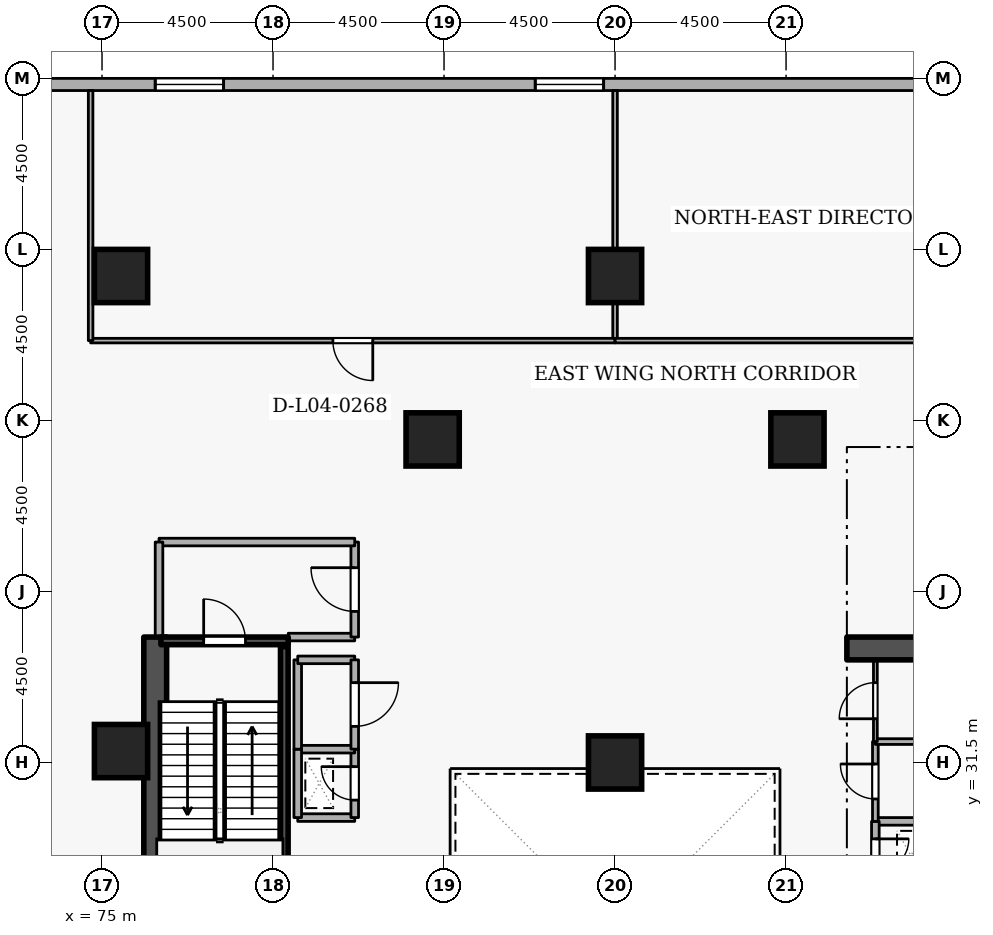
"""IFC4 building model, lengths in metres.
Left out: names, types, materials, properties, quantities, classifications, styles, units other than length and angle.
Written with IfcOpenShell. Run it as: python <this file> out.ifc"""

import sys

from ifc_helpers import new_model, si_unit, direction, frame, frame_2d, origin, origin_2d, place, context, subcontext, project, spatial, rectangle, extrude, element, fill, save


model = new_model("IFC4")
c1 = context("Model", 3, precision=1e-05, world=origin(), true_north=direction((0.0, 1.0)))
c2 = subcontext(c1, "Body", "Model", "MODEL_VIEW")
j1 = project(units=[si_unit("LENGTHUNIT", "METRE"), si_unit("PLANEANGLEUNIT", "RADIAN")], contexts=[c1])
p1 = place(None, origin())
s1 = spatial("IfcSite", under=j1, at=p1, CompositionType="ELEMENT")
p2 = place(p1, origin())
s2 = spatial("IfcBuilding", under=s1, at=p2, CompositionType="ELEMENT")
p3 = place(p2, frame((0.0, 0.0, 18.6)))
s3 = spatial("IfcBuildingStorey", under=s2, at=p3, CompositionType="ELEMENT", Elevation=18.6)
p4 = place(p3, frame((94.6, 34.5, 0.0), z_axis=(0.0, 0.0, 1.0), x_axis=(1.0, 0.0, 0.0)))
e1 = element("IfcWall", 1, at=p4, inside=s3, PredefinedType="SHEAR", context=c2, shape_type="SweptSolid", body=[
    extrude(rectangle(XDim=5.7, YDim=0.6, at=frame_2d((2.85, 0.0))), origin(), (0.0, 0.0, 1.0), 4.5),
])
p5 = place(p3, frame((76.4, 19.2, 0.0), z_axis=(0.0, 0.0, 1.0), x_axis=(0.0, 1.0, 0.0)))
e2 = element("IfcWall", 2, at=p5, inside=s3, PredefinedType="SHEAR", context=c2, shape_type="SweptSolid", body=[
    extrude(rectangle(XDim=15.6, YDim=0.6, at=frame_2d((7.8, 0.0))), origin(), (0.0, 0.0, 1.0), 4.5),
])
for number, where, z_axis, x_axis in (
    (3, (88.5, 44.3, 0.0), (0.0, 0.0, 1.0), (1.0, 0.0, 0.0)),
    (4, (75.5, 44.3, 0.0), (0.0, 0.0, 1.0), (1.0, 0.0, 0.0)),
    (5, (93.3, 40.0, 0.0), (0.0, 0.0, 1.0), (1.0, 0.0, 0.0)),
    (6, (83.7, 40.0, 0.0), (0.0, 0.0, 1.0), (1.0, 0.0, 0.0)),
    (7, (75.5, 31.8, 0.0), (0.0, 0.0, 1.0), (1.0, 0.0, 0.0)),
    (8, (88.5, 31.5, 0.0), (0.0, 0.0, 1.0), (1.0, 0.0, 0.0)),
):
    element("IfcColumn", number, at=place(p3, frame(where, z_axis=z_axis, x_axis=x_axis)), inside=s3, PredefinedType="COLUMN", context=c2, shape_type="SweptSolid", body=[
        extrude(rectangle(XDim=1.4, YDim=1.4, at=origin_2d()), origin(), (0.0, 0.0, 1.0), 4.5),
    ])
p6 = place(p3, frame((111.0, 49.34, 0.0), z_axis=(0.0, 0.0, 1.0), x_axis=(-1.0, 0.0, 0.0)))
e9 = element("IfcWall", 9, at=p6, inside=s3, PredefinedType="STANDARD", context=c2, shape_type="SweptSolid", body=[
    extrude(rectangle(XDim=39.4, YDim=0.32, at=frame_2d((19.7, 0.0))), origin(), (0.0, 0.0, 1.0), 3.56),
])
p7 = place(p6, frame((3.0, 0.0, 0.78)))
e10 = element("IfcOpeningElement", 10, at=p7, cuts=e9, PredefinedType="OPENING", context=c2, shape_type="SweptSolid", body=[
    extrude(rectangle(XDim=1.8, YDim=2.15, at=frame_2d((0.9, 1.075))), frame((0.0, 0.17, 0.0), z_axis=(0.0, -1.0, 0.0), x_axis=(1.0, 0.0, 0.0)), (0.0, 0.0, 1.0), 0.34),
])
p8 = place(p6, frame((12.8, 0.0, 0.78)))
e11 = element("IfcOpeningElement", 11, at=p8, cuts=e9, PredefinedType="OPENING", context=c2, shape_type="SweptSolid", body=[
    extrude(rectangle(XDim=1.8, YDim=2.15, at=frame_2d((0.9, 1.075))), frame((0.0, 0.17, 0.0), z_axis=(0.0, -1.0, 0.0), x_axis=(1.0, 0.0, 0.0)), (0.0, 0.0, 1.0), 0.34),
])
p9 = place(p6, frame((22.8, 0.0, 0.78)))
e12 = element("IfcOpeningElement", 12, at=p9, cuts=e9, PredefinedType="OPENING", context=c2, shape_type="SweptSolid", body=[
    extrude(rectangle(XDim=1.8, YDim=2.15, at=frame_2d((0.9, 1.075))), frame((0.0, 0.17, 0.0), z_axis=(0.0, -1.0, 0.0), x_axis=(1.0, 0.0, 0.0)), (0.0, 0.0, 1.0), 0.34),
])
p10 = place(p6, frame((32.8, 0.0, 0.78)))
e13 = element("IfcOpeningElement", 13, at=p10, cuts=e9, PredefinedType="OPENING", context=c2, shape_type="SweptSolid", body=[
    extrude(rectangle(XDim=1.8, YDim=2.15, at=frame_2d((0.9, 1.075))), frame((0.0, 0.17, 0.0), z_axis=(0.0, -1.0, 0.0), x_axis=(1.0, 0.0, 0.0)), (0.0, 0.0, 1.0), 0.34),
])
p11 = place(p3, frame((76.55, 34.7, 0.0), z_axis=(0.0, 0.0, 1.0), x_axis=(1.0, 0.0, 0.0)))
e14 = element("IfcWall", 14, at=p11, inside=s3, PredefinedType="SHEAR", context=c2, shape_type="SweptSolid", body=[
    extrude(rectangle(XDim=3.35, YDim=0.2, at=frame_2d((1.675, 0.0))), origin(), (0.0, 0.0, 1.0), 4.5),
])
p12 = place(p11, frame((1.125, 0.0, 0.0)))
e15 = element("IfcOpeningElement", 15, at=p12, cuts=e14, PredefinedType="OPENING", context=c2, shape_type="SweptSolid", body=[
    extrude(rectangle(XDim=1.1, YDim=2.1, at=frame_2d((0.55, 1.05))), frame((0.0, 0.11, 0.0), z_axis=(0.0, -1.0, 0.0), x_axis=(1.0, 0.0, 0.0)), (0.0, 0.0, 1.0), 0.22),
])
p13 = place(p3, frame((79.797, 27.45, 0.0), z_axis=(0.0, 0.0, 1.0), x_axis=(0.0, 1.0, 0.0)))
e16 = element("IfcWall", 16, at=p13, inside=s3, PredefinedType="SHEAR", context=c2, shape_type="SweptSolid", body=[
    extrude(rectangle(XDim=7.1, YDim=0.2, at=frame_2d((3.55, 0.0))), origin(), (0.0, 0.0, 1.0), 4.5),
])
p14 = place(p3, frame((79.9, 34.8, 0.0), z_axis=(0.0, 0.0, 1.0), x_axis=(1.0, 0.0, 0.0)))
e17 = element("IfcWall", 17, at=p14, inside=s3, PredefinedType="STANDARD", context=c2, shape_type="SweptSolid", body=[
    extrude(rectangle(XDim=1.75, YDim=0.2, at=frame_2d((0.875, 0.0))), origin(), (0.0, 0.0, 1.0), 3.365),
])
p15 = place(p3, frame((81.65, 34.8, 0.0), z_axis=(0.0, 0.0, 1.0), x_axis=(0.0, 1.0, 0.0)))
e18 = element("IfcWall", 18, at=p15, inside=s3, PredefinedType="STANDARD", context=c2, shape_type="SweptSolid", body=[
    extrude(rectangle(XDim=2.5, YDim=0.2, at=frame_2d((1.25, 0.0))), origin(), (0.0, 0.0, 1.0), 4.16),
])
p16 = place(p15, frame((0.675, 0.0, 0.0)))
e19 = element("IfcOpeningElement", 19, at=p16, cuts=e18, PredefinedType="OPENING", context=c2, shape_type="SweptSolid", body=[
    extrude(rectangle(XDim=1.15, YDim=2.1, at=frame_2d((0.575, 1.05))), frame((0.0, 0.11, 0.0), z_axis=(0.0, -1.0, 0.0), x_axis=(1.0, 0.0, 0.0)), (0.0, 0.0, 1.0), 0.22),
])
p17 = place(p3, frame((81.65, 37.3, 0.0), z_axis=(0.0, 0.0, 1.0), x_axis=(-1.0, 0.0, 0.0)))
e20 = element("IfcWall", 20, at=p17, inside=s3, PredefinedType="STANDARD", context=c2, shape_type="SweptSolid", body=[
    extrude(rectangle(XDim=5.15, YDim=0.2, at=frame_2d((2.575, 0.0))), origin(), (0.0, 0.0, 1.0), 4.16),
])
p18 = place(p3, frame((76.5, 37.3, 0.0), z_axis=(0.0, 0.0, 1.0), x_axis=(0.0, -1.0, 0.0)))
e21 = element("IfcWall", 21, at=p18, inside=s3, PredefinedType="STANDARD", context=c2, shape_type="SweptSolid", body=[
    extrude(rectangle(XDim=2.5, YDim=0.2, at=frame_2d((1.25, 0.0))), origin(), (0.0, 0.0, 1.0), 4.16),
])
p19 = place(p3, frame((96.85, 29.95, 0.0), z_axis=(0.0, 0.0, 1.0), x_axis=(-1.0, 0.0, 0.0)))
e22 = element("IfcWall", 22, at=p19, inside=s3, PredefinedType="STANDARD", context=c2, shape_type="SweptSolid", body=[
    extrude(rectangle(XDim=1.5, YDim=0.2, at=frame_2d((0.75, 0.0))), origin(), (0.0, 0.0, 1.0), 4.16),
])
p20 = place(p3, frame((95.35, 29.95, 0.0), z_axis=(0.0, 0.0, 1.0), x_axis=(0.0, -1.0, 0.0)))
e23 = element("IfcWall", 23, at=p20, inside=s3, PredefinedType="STANDARD", context=c2, shape_type="SweptSolid", body=[
    extrude(rectangle(XDim=1.8, YDim=0.2, at=frame_2d((0.9, 0.0))), origin(), (0.0, 0.0, 1.0), 4.16),
])
p21 = place(p20, frame((0.46, 0.0, 0.0)))
e24 = element("IfcOpeningElement", 24, at=p21, cuts=e23, PredefinedType="OPENING", context=c2, shape_type="SweptSolid", body=[
    extrude(rectangle(XDim=0.88, YDim=2.04, at=frame_2d((0.44, 1.02))), frame((0.0, 0.11, 0.0), z_axis=(0.0, -1.0, 0.0), x_axis=(1.0, 0.0, 0.0)), (0.0, 0.0, 1.0), 0.22),
])
p22 = place(p3, frame((80.15, 30.05, 0.0), z_axis=(0.0, 0.0, 1.0), x_axis=(1.0, 0.0, 0.0)))
e25 = element("IfcWall", 25, at=p22, inside=s3, PredefinedType="STANDARD", context=c2, shape_type="SweptSolid", body=[
    extrude(rectangle(XDim=1.5, YDim=0.2, at=frame_2d((0.75, 0.0))), origin(), (0.0, 0.0, 1.0), 4.16),
])
p23 = place(p3, frame((81.65, 30.05, 0.0), z_axis=(0.0, 0.0, 1.0), x_axis=(0.0, 1.0, 0.0)))
e26 = element("IfcWall", 26, at=p23, inside=s3, PredefinedType="STANDARD", context=c2, shape_type="SweptSolid", body=[
    extrude(rectangle(XDim=1.8, YDim=0.2, at=frame_2d((0.9, 0.0))), origin(), (0.0, 0.0, 1.0), 4.16),
])
p24 = place(p23, frame((0.46, 0.0, 0.0)))
e27 = element("IfcOpeningElement", 27, at=p24, cuts=e26, PredefinedType="OPENING", context=c2, shape_type="SweptSolid", body=[
    extrude(rectangle(XDim=0.88, YDim=2.04, at=frame_2d((0.44, 1.02))), frame((0.0, 0.11, 0.0), z_axis=(0.0, -1.0, 0.0), x_axis=(1.0, 0.0, 0.0)), (0.0, 0.0, 1.0), 0.22),
])
p25 = place(p3, frame((81.65, 31.85, 0.0), z_axis=(0.0, 0.0, 1.0), x_axis=(-1.0, 0.0, 0.0)))
e28 = element("IfcWall", 28, at=p25, inside=s3, PredefinedType="STANDARD", context=c2, shape_type="SweptSolid", body=[
    extrude(rectangle(XDim=1.5, YDim=0.2, at=frame_2d((0.75, 0.0))), origin(), (0.0, 0.0, 1.0), 4.16),
])
p26 = place(p3, frame((80.15, 31.85, 0.0), z_axis=(0.0, 0.0, 1.0), x_axis=(0.0, -1.0, 0.0)))
e29 = element("IfcWall", 29, at=p26, inside=s3, PredefinedType="STANDARD", context=c2, shape_type="SweptSolid", body=[
    extrude(rectangle(XDim=1.8, YDim=0.2, at=frame_2d((0.9, 0.0))), origin(), (0.0, 0.0, 1.0), 4.16),
])
p27 = place(p3, frame((80.15, 31.85, 0.0), z_axis=(0.0, 0.0, 1.0), x_axis=(0.0, 1.0, 0.0)))
e30 = element("IfcWall", 30, at=p27, inside=s3, PredefinedType="STANDARD", context=c2, shape_type="SweptSolid", body=[
    extrude(rectangle(XDim=2.35, YDim=0.2, at=frame_2d((1.175, 0.0))), origin(), (0.0, 0.0, 1.0), 4.16),
])
p28 = place(p3, frame((80.15, 34.2, 0.0), z_axis=(0.0, 0.0, 1.0), x_axis=(1.0, 0.0, 0.0)))
e31 = element("IfcWall", 31, at=p28, inside=s3, PredefinedType="STANDARD", context=c2, shape_type="SweptSolid", body=[
    extrude(rectangle(XDim=1.5, YDim=0.2, at=frame_2d((0.75, 0.0))), origin(), (0.0, 0.0, 1.0), 3.365),
])
p29 = place(p3, frame((81.65, 34.2, 0.0), z_axis=(0.0, 0.0, 1.0), x_axis=(0.0, -1.0, 0.0)))
e32 = element("IfcWall", 32, at=p29, inside=s3, PredefinedType="STANDARD", context=c2, shape_type="SweptSolid", body=[
    extrude(rectangle(XDim=2.35, YDim=0.2, at=frame_2d((1.175, 0.0))), origin(), (0.0, 0.0, 1.0), 4.16),
])
p30 = place(p29, frame((0.6, 0.0, 0.0)))
e33 = element("IfcOpeningElement", 33, at=p30, cuts=e32, PredefinedType="OPENING", context=c2, shape_type="SweptSolid", body=[
    extrude(rectangle(XDim=1.15, YDim=2.1, at=frame_2d((0.575, 1.05))), frame((0.0, 0.11, 0.0), z_axis=(0.0, -1.0, 0.0), x_axis=(1.0, 0.0, 0.0)), (0.0, 0.0, 1.0), 0.22),
])
p31 = place(p3, frame((95.35, 29.95, 0.0), z_axis=(0.0, 0.0, 1.0), x_axis=(0.0, 1.0, 0.0)))
e34 = element("IfcWall", 34, at=p31, inside=s3, PredefinedType="PARTITIONING", context=c2, shape_type="SweptSolid", body=[
    extrude(rectangle(XDim=2.1, YDim=0.15, at=frame_2d((1.05, 0.0))), origin(), (0.0, 0.0, 1.0), 4.16),
])
p32 = place(p31, frame((0.59, 0.0, 0.0)))
e35 = element("IfcOpeningElement", 35, at=p32, cuts=e34, PredefinedType="OPENING", context=c2, shape_type="SweptSolid", body=[
    extrude(rectangle(XDim=0.92, YDim=2.08, at=frame_2d((0.46, 1.04))), frame((0.0, 0.085, 0.0), z_axis=(0.0, -1.0, 0.0), x_axis=(1.0, 0.0, 0.0)), (0.0, 0.0, 1.0), 0.17),
])
p33 = place(p3, frame((95.35, 32.05, 0.0), z_axis=(0.0, 0.0, 1.0), x_axis=(1.0, 0.0, 0.0)))
e36 = element("IfcWall", 36, at=p33, inside=s3, PredefinedType="PARTITIONING", context=c2, shape_type="SweptSolid", body=[
    extrude(rectangle(XDim=1.5, YDim=0.15, at=frame_2d((0.75, 0.0))), origin(), (0.0, 0.0, 1.0), 4.16),
])
p34 = place(p3, frame((95.35, 32.05, 0.0), z_axis=(0.0, 0.0, 1.0), x_axis=(0.0, 1.0, 0.0)))
e37 = element("IfcWall", 37, at=p34, inside=s3, PredefinedType="PARTITIONING", context=c2, shape_type="SweptSolid", body=[
    extrude(rectangle(XDim=2.15, YDim=0.1, at=frame_2d((1.075, 0.0))), origin(), (0.0, 0.0, 1.0), 4.16),
])
p35 = place(p34, frame((0.6, 0.0, 0.0)))
e38 = element("IfcOpeningElement", 38, at=p35, cuts=e37, PredefinedType="OPENING", context=c2, shape_type="SweptSolid", body=[
    extrude(rectangle(XDim=0.95, YDim=2.1, at=frame_2d((0.475, 1.05))), frame((0.0, 0.06, 0.0), z_axis=(0.0, -1.0, 0.0), x_axis=(1.0, 0.0, 0.0)), (0.0, 0.0, 1.0), 0.12),
])
p36 = place(p3, frame((88.5, 49.18, 0.0), z_axis=(0.0, 0.0, 1.0), x_axis=(0.0, -1.0, 0.0)))
e39 = element("IfcWall", 39, at=p36, inside=s3, PredefinedType="PARTITIONING", context=c2, shape_type="SweptSolid", body=[
    extrude(rectangle(XDim=6.58, YDim=0.12, at=frame_2d((3.29, 0.0))), origin(), (0.0, 0.0, 1.0), 4.16),
])
p37 = place(p3, frame((88.5, 42.6, 0.0), z_axis=(0.0, 0.0, 1.0), x_axis=(-1.0, 0.0, 0.0)))
e40 = element("IfcWall", 40, at=p37, inside=s3, PredefinedType="PARTITIONING", context=c2, shape_type="SweptSolid", body=[
    extrude(rectangle(XDim=13.8, YDim=0.12, at=frame_2d((6.9, 0.0))), origin(), (0.0, 0.0, 1.0), 4.16),
])
p38 = place(p37, frame((6.375, 0.0, 0.0)))
e41 = element("IfcOpeningElement", 41, at=p38, cuts=e40, PredefinedType="OPENING", context=c2, shape_type="SweptSolid", body=[
    extrude(rectangle(XDim=1.05, YDim=2.1, at=frame_2d((0.525, 1.05))), frame((0.0, 0.07, 0.0), z_axis=(0.0, -1.0, 0.0), x_axis=(1.0, 0.0, 0.0)), (0.0, 0.0, 1.0), 0.14),
])
p39 = place(p3, frame((74.7, 42.6, 0.0), z_axis=(0.0, 0.0, 1.0), x_axis=(0.0, 1.0, 0.0)))
e42 = element("IfcWall", 42, at=p39, inside=s3, PredefinedType="PARTITIONING", context=c2, shape_type="SweptSolid", body=[
    extrude(rectangle(XDim=6.58, YDim=0.12, at=frame_2d((3.29, 0.0))), origin(), (0.0, 0.0, 1.0), 4.16),
])
p40 = place(p3, frame((110.7, 42.6, 0.0), z_axis=(0.0, 0.0, 1.0), x_axis=(-1.0, 0.0, 0.0)))
e43 = element("IfcWall", 43, at=p40, inside=s3, PredefinedType="PARTITIONING", context=c2, shape_type="SweptSolid", body=[
    extrude(rectangle(XDim=22.2, YDim=0.12, at=frame_2d((11.1, 0.0))), origin(), (0.0, 0.0, 1.0), 4.16),
])
p41 = place(p40, frame((10.575, 0.0, 0.0)))
e44 = element("IfcOpeningElement", 44, at=p41, cuts=e43, PredefinedType="OPENING", context=c2, shape_type="SweptSolid", body=[
    extrude(rectangle(XDim=1.05, YDim=2.1, at=frame_2d((0.525, 1.05))), frame((0.0, 0.07, 0.0), z_axis=(0.0, -1.0, 0.0), x_axis=(1.0, 0.0, 0.0)), (0.0, 0.0, 1.0), 0.14),
])
p42 = place(p9, origin())
e45 = element("IfcWindow", 45, at=p42, inside=s3, PartitioningType="SINGLE_PANEL", PredefinedType="WINDOW", context=c2, shape_type="SweptSolid", body=[
    extrude(rectangle(XDim=1.8, YDim=2.15, at=frame_2d((0.9, 1.075))), frame((0.0, 0.03, 0.0), z_axis=(0.0, -1.0, 0.0), x_axis=(1.0, 0.0, 0.0)), (0.0, 0.0, 1.0), 0.06),
])
fill(e12, e45)
p43 = place(p10, origin())
e46 = element("IfcWindow", 46, at=p43, inside=s3, PartitioningType="SINGLE_PANEL", PredefinedType="WINDOW", context=c2, shape_type="SweptSolid", body=[
    extrude(rectangle(XDim=1.8, YDim=2.15, at=frame_2d((0.9, 1.075))), frame((0.0, 0.03, 0.0), z_axis=(0.0, -1.0, 0.0), x_axis=(1.0, 0.0, 0.0)), (0.0, 0.0, 1.0), 0.06),
])
fill(e13, e46)
p44 = place(p12, origin())
e47 = element("IfcDoor", 47, at=p44, inside=s3, OperationType="SINGLE_SWING_LEFT", PredefinedType="DOOR", context=c2, shape_type="SweptSolid", body=[
    extrude(rectangle(XDim=1.1, YDim=2.1, at=frame_2d((0.55, 1.05))), frame((0.0, 0.025, 0.0), z_axis=(0.0, -1.0, 0.0), x_axis=(1.0, 0.0, 0.0)), (0.0, 0.0, 1.0), 0.05),
])
fill(e15, e47)
p45 = place(p16, origin())
e48 = element("IfcDoor", 48, at=p45, inside=s3, OperationType="SINGLE_SWING_RIGHT", PredefinedType="DOOR", context=c2, shape_type="SweptSolid", body=[
    extrude(rectangle(XDim=1.15, YDim=2.1, at=frame_2d((0.575, 1.05))), frame((0.0, 0.025, 0.0), z_axis=(0.0, -1.0, 0.0), x_axis=(1.0, 0.0, 0.0)), (0.0, 0.0, 1.0), 0.05),
])
fill(e19, e48)
p46 = place(p21, origin())
e49 = element("IfcDoor", 49, at=p46, inside=s3, OperationType="SINGLE_SWING_LEFT", PredefinedType="DOOR", context=c2, shape_type="SweptSolid", body=[
    extrude(rectangle(XDim=0.88, YDim=2.04, at=frame_2d((0.44, 1.02))), frame((0.0, 0.025, 0.0), z_axis=(0.0, -1.0, 0.0), x_axis=(1.0, 0.0, 0.0)), (0.0, 0.0, 1.0), 0.05),
])
fill(e24, e49)
p47 = place(p24, origin())
e50 = element("IfcDoor", 50, at=p47, inside=s3, OperationType="SINGLE_SWING_RIGHT", PredefinedType="DOOR", context=c2, shape_type="SweptSolid", body=[
    extrude(rectangle(XDim=0.88, YDim=2.04, at=frame_2d((0.44, 1.02))), frame((0.0, 0.025, 0.0), z_axis=(0.0, -1.0, 0.0), x_axis=(1.0, 0.0, 0.0)), (0.0, 0.0, 1.0), 0.05),
])
fill(e27, e50)
p48 = place(p32, origin())
e51 = element("IfcDoor", 51, at=p48, inside=s3, OperationType="SINGLE_SWING_RIGHT", PredefinedType="DOOR", context=c2, shape_type="SweptSolid", body=[
    extrude(rectangle(XDim=0.92, YDim=2.08, at=frame_2d((0.46, 1.04))), frame((0.0, 0.025, 0.0), z_axis=(0.0, -1.0, 0.0), x_axis=(1.0, 0.0, 0.0)), (0.0, 0.0, 1.0), 0.05),
])
fill(e35, e51)
p49 = place(p35, origin())
e52 = element("IfcDoor", 52, at=p49, inside=s3, OperationType="SINGLE_SWING_LEFT", PredefinedType="DOOR", context=c2, shape_type="SweptSolid", body=[
    extrude(rectangle(XDim=0.95, YDim=2.1, at=frame_2d((0.475, 1.05))), frame((0.0, 0.025, 0.0), z_axis=(0.0, -1.0, 0.0), x_axis=(1.0, 0.0, 0.0)), (0.0, 0.0, 1.0), 0.05),
])
fill(e38, e52)
p50 = place(p30, origin())
e53 = element("IfcDoor", 53, at=p50, inside=s3, OperationType="SINGLE_SWING_LEFT", PredefinedType="DOOR", context=c2, shape_type="SweptSolid", body=[
    extrude(rectangle(XDim=1.15, YDim=2.1, at=frame_2d((0.575, 1.05))), frame((0.0, 0.025, 0.0), z_axis=(0.0, -1.0, 0.0), x_axis=(1.0, 0.0, 0.0)), (0.0, 0.0, 1.0), 0.05),
])
fill(e33, e53)
p51 = place(p38, origin())
e54 = element("IfcDoor", 54, at=p51, inside=s3, OperationType="SINGLE_SWING_LEFT", PredefinedType="DOOR", context=c2, shape_type="SweptSolid", body=[
    extrude(rectangle(XDim=1.05, YDim=2.1, at=frame_2d((0.525, 1.05))), frame((0.0, 0.025, 0.0), z_axis=(0.0, -1.0, 0.0), x_axis=(1.0, 0.0, 0.0)), (0.0, 0.0, 1.0), 0.05),
])
fill(e41, e54)
save(model, sys.argv[1])
